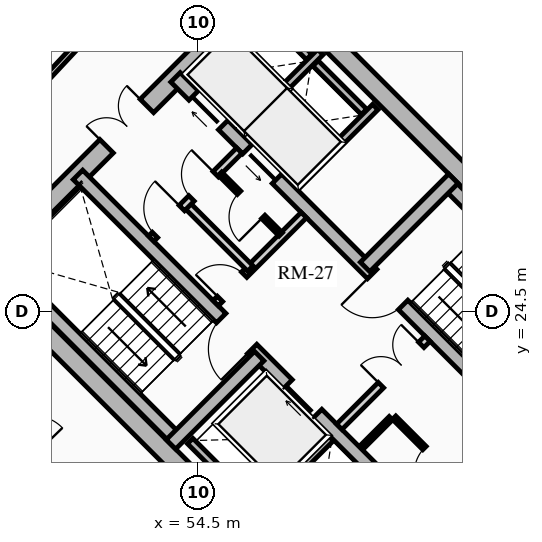
"""IFC4 building model, lengths in metres.
Left out: names, types, materials, properties, quantities, classifications, styles, units other than length and angle.
Written with IfcOpenShell. Run it as: python <this file> out.ifc"""

import sys

from ifc_helpers import new_model, si_unit, direction, frame, frame_2d, origin, place, context, subcontext, project, spatial, rectangle, extrude, source, transform, mapped, element, fill, save


model = new_model("IFC4")
c1 = context("Model", 3, precision=1e-05, world=origin(), true_north=direction((0.0, 1.0)))
c2 = subcontext(c1, "Body", "Model", "MODEL_VIEW")
j1 = project(units=[si_unit("LENGTHUNIT", "METRE"), si_unit("PLANEANGLEUNIT", "RADIAN")], contexts=[c1])
p1 = place(None, origin())
s1 = spatial("IfcSite", under=j1, at=p1, CompositionType="ELEMENT")
p2 = place(p1, origin())
s2 = spatial("IfcBuilding", under=s1, at=p2, CompositionType="ELEMENT")
p3 = place(p2, frame((0.0, 0.0, 30.73)))
s3 = spatial("IfcBuildingStorey", under=s2, at=p3, CompositionType="ELEMENT", Elevation=30.73)
for number, where, z_axis, x_axis in (
    (1, (58.773, 15.661, 0.0), (0.0, 0.0, 1.0), (-0.707, 0.707, 0.0)),
    (2, (66.339, 23.227, 0.0), (0.0, 0.0, 1.0), (-0.707, 0.707, 0.0)),
):
    element("IfcWall", number, at=place(p3, frame(where, z_axis=z_axis, x_axis=x_axis)), inside=s3, PredefinedType="SHEAR", context=c2, shape_type="SweptSolid", body=[
        extrude(rectangle(XDim=14.3, YDim=0.5, at=frame_2d((7.15, 0.0))), origin(), (0.0, 0.0, 1.0), 2.91),
    ])
p4 = place(p3, frame((58.596, 15.838, 0.0), z_axis=(0.0, 0.0, 1.0), x_axis=(0.707106781187, 0.707106781187, 0.0)))
e3 = element("IfcWall", 3, at=p4, inside=s3, PredefinedType="SHEAR", context=c2, shape_type="SweptSolid", body=[
    extrude(rectangle(XDim=10.7, YDim=0.5, at=frame_2d((5.35, 0.0))), origin(), (0.0, 0.0, 1.0), 2.91),
])
m1 = source(origin(), c2, "Body", "SweptSolid", [
    extrude(rectangle(XDim=1.5, YDim=2.02, at=frame_2d((0.75, 1.01))), frame((0.0, 0.26, 0.0), z_axis=(0.0, -1.0, 0.0), x_axis=(1.0, 0.0, 0.0)), (0.0, 0.0, 1.0), 0.52),
])
p5 = place(p4, frame((5.45, 0.0, 0.0)))
e4 = element("IfcOpeningElement", 4, at=p5, cuts=e3, PredefinedType="OPENING", context=c2, shape_type="MappedRepresentation", body=[
    mapped(m1, transform((0.0, 0.0, 0.0), x_axis=(1.0, 0.0, 0.0), y_axis=(0.0, 1.0, 0.0), z_axis=(0.0, 0.0, 1.0), scale=1.0)),
])
p6 = place(p3, frame((48.838, 25.596, 0.0), z_axis=(0.0, 0.0, 1.0), x_axis=(0.707106781187, 0.707106781187, 0.0)))
e5 = element("IfcWall", 5, at=p6, inside=s3, PredefinedType="SHEAR", context=c2, shape_type="SweptSolid", body=[
    extrude(rectangle(XDim=10.7, YDim=0.5, at=frame_2d((5.35, 0.0))), origin(), (0.0, 0.0, 1.0), 2.91),
])
p7 = place(p6, frame((4.6, 0.0, 0.0)))
e6 = element("IfcOpeningElement", 6, at=p7, cuts=e5, PredefinedType="OPENING", context=c2, shape_type="MappedRepresentation", body=[
    mapped(m1, transform((0.0, 0.0, 0.0), x_axis=(1.0, 0.0, 0.0), y_axis=(0.0, 1.0, 0.0), z_axis=(0.0, 0.0, 1.0), scale=1.0)),
])
p8 = place(p3, frame((61.096, 18.338, 0.0), z_axis=(0.0, 0.0, 1.0), x_axis=(-0.707106781187, 0.707106781187, 0.0)))
e7 = element("IfcWall", 7, at=p8, inside=s3, PredefinedType="SHEAR", context=c2, shape_type="SweptSolid", body=[
    extrude(rectangle(XDim=13.8, YDim=0.35, at=frame_2d((6.9, 0.0))), origin(), (0.0, 0.0, 1.0), 2.91),
])
m2 = source(origin(), c2, "Body", "SweptSolid", [
    extrude(rectangle(XDim=1.1, YDim=2.015, at=frame_2d((0.55, 1.007))), frame((0.0, 0.185, 0.0), z_axis=(0.0, -1.0, 0.0), x_axis=(1.0, 0.0, 0.0)), (0.0, 0.0, 1.0), 0.37),
])
p9 = place(p8, frame((4.9, 0.0, 0.0)))
e8 = element("IfcOpeningElement", 8, at=p9, cuts=e7, PredefinedType="OPENING", context=c2, shape_type="MappedRepresentation", body=[
    mapped(m2, transform((0.0, 0.0, 0.0), x_axis=(1.0, 0.0, 0.0), y_axis=(0.0, 1.0, 0.0), z_axis=(0.0, 0.0, 1.0), scale=1.0)),
])
m3 = source(origin(), c2, "Body", "SweptSolid", [
    extrude(rectangle(XDim=1.15, YDim=2.02, at=frame_2d((0.575, 1.01))), frame((0.0, 0.185, 0.0), z_axis=(0.0, -1.0, 0.0), x_axis=(1.0, 0.0, 0.0)), (0.0, 0.0, 1.0), 0.37),
])
p10 = place(p8, frame((7.32, 0.0, 0.0)))
e9 = element("IfcOpeningElement", 9, at=p10, cuts=e7, PredefinedType="OPENING", context=c2, shape_type="MappedRepresentation", body=[
    mapped(m3, transform((0.0, 0.0, 0.0), x_axis=(1.0, 0.0, 0.0), y_axis=(0.0, 1.0, 0.0), z_axis=(0.0, 0.0, 1.0), scale=1.0)),
])
p11 = place(p3, frame((63.662, 20.904, 0.0), z_axis=(0.0, 0.0, 1.0), x_axis=(-0.707106781187, 0.707106781187, 0.0)))
e10 = element("IfcWall", 10, at=p11, inside=s3, PredefinedType="SHEAR", context=c2, shape_type="SweptSolid", body=[
    extrude(rectangle(XDim=13.8, YDim=0.35, at=frame_2d((6.9, 0.0))), origin(), (0.0, 0.0, 1.0), 2.91),
])
p12 = place(p11, frame((10.025, 0.0, 0.0)))
e11 = element("IfcOpeningElement", 11, at=p12, cuts=e10, PredefinedType="OPENING", context=c2, shape_type="MappedRepresentation", body=[
    mapped(m2, transform((0.0, 0.0, 0.0), x_axis=(1.0, 0.0, 0.0), y_axis=(0.0, 1.0, 0.0), z_axis=(0.0, 0.0, 1.0), scale=1.0)),
])
p13 = place(p11, frame((12.025, 0.0, 0.0)))
e12 = element("IfcOpeningElement", 12, at=p13, cuts=e10, PredefinedType="OPENING", context=c2, shape_type="MappedRepresentation", body=[
    mapped(m2, transform((0.0, 0.0, 0.0), x_axis=(1.0, 0.0, 0.0), y_axis=(0.0, 1.0, 0.0), z_axis=(0.0, 0.0, 1.0), scale=1.0)),
])
p14 = place(p11, frame((5.33, 0.0, 0.0)))
e13 = element("IfcOpeningElement", 13, at=p14, cuts=e10, PredefinedType="OPENING", context=c2, shape_type="MappedRepresentation", body=[
    mapped(m3, transform((0.0, 0.0, 0.0), x_axis=(1.0, 0.0, 0.0), y_axis=(0.0, 1.0, 0.0), z_axis=(0.0, 0.0, 1.0), scale=1.0)),
])
p15 = place(p3, frame((53.922, 21.141, 0.0), z_axis=(0.0, 0.0, 1.0), x_axis=(-0.707106781187, 0.707106781187, 0.0)))
e14 = element("IfcWall", 14, at=p15, inside=s3, PredefinedType="SHEAR", context=c2, shape_type="SweptSolid", body=[
    extrude(rectangle(XDim=6.745, YDim=0.35, at=frame_2d((3.373, 0.0))), origin(), (0.0, 0.0, 1.0), 2.91),
])
p16 = place(p3, frame((53.784, 21.003, 0.0), z_axis=(0.0, 0.0, 1.0), x_axis=(0.707106781187, 0.707106781187, 0.0)))
e15 = element("IfcWall", 15, at=p16, inside=s3, PredefinedType="SHEAR", context=c2, shape_type="SweptSolid", body=[
    extrude(rectangle(XDim=3.285, YDim=0.35, at=frame_2d((1.643, 0.0))), origin(), (0.0, 0.0, 1.0), 2.91),
])
p17 = place(p3, frame((65.847, 23.089, 0.0), z_axis=(0.0, 0.0, 1.0), x_axis=(-0.707106781187, 0.707106781187, 0.0)))
e16 = element("IfcWall", 16, at=p17, inside=s3, PredefinedType="SHEAR", context=c2, shape_type="SweptSolid", body=[
    extrude(rectangle(XDim=6.745, YDim=0.35, at=frame_2d((3.373, 0.0))), origin(), (0.0, 0.0, 1.0), 2.91),
])
p18 = place(p3, frame((58.893, 25.674, 0.0), z_axis=(0.0, 0.0, 1.0), x_axis=(0.707106781187, 0.707106781187, 0.0)))
e17 = element("IfcWall", 17, at=p18, inside=s3, PredefinedType="SHEAR", context=c2, shape_type="SweptSolid", body=[
    extrude(rectangle(XDim=3.285, YDim=0.35, at=frame_2d((1.643, 0.0))), origin(), (0.0, 0.0, 1.0), 2.91),
])
p19 = place(p3, frame((55.888, 19.069, 0.0), z_axis=(0.0, 0.0, 1.0), x_axis=(0.707106781187, 0.707106781187, 0.0)))
e18 = element("IfcWall", 18, at=p19, inside=s3, PredefinedType="SHEAR", context=c2, shape_type="SweptSolid", body=[
    extrude(rectangle(XDim=2.97, YDim=0.2, at=frame_2d((1.485, 0.0))), origin(), (0.0, 0.0, 1.0), 2.91),
])
p20 = place(p3, frame((56.015, 19.366, 0.0), z_axis=(0.0, 0.0, 1.0), x_axis=(-0.707106781187, 0.707106781187, 0.0)))
e19 = element("IfcWall", 19, at=p20, inside=s3, PredefinedType="SHEAR", context=c2, shape_type="SweptSolid", body=[
    extrude(rectangle(XDim=2.44, YDim=0.2, at=frame_2d((1.22, 0.0))), origin(), (0.0, 0.0, 1.0), 2.91),
])
p21 = place(p3, frame((57.062, 27.781, 0.0), z_axis=(0.0, 0.0, 1.0), x_axis=(0.707106781187, 0.707106781187, 0.0)))
e20 = element("IfcWall", 20, at=p21, inside=s3, PredefinedType="SHEAR", context=c2, shape_type="SweptSolid", body=[
    extrude(rectangle(XDim=2.97, YDim=0.2, at=frame_2d((1.485, 0.0))), origin(), (0.0, 0.0, 1.0), 2.91),
])
p22 = place(p3, frame((55.615, 29.227, 0.0), z_axis=(0.0, 0.0, 1.0), x_axis=(0.707147878904, 0.70706568108, 0.0)))
e21 = element("IfcWall", 21, at=p22, inside=s3, PredefinedType="SHEAR", context=c2, shape_type="SweptSolid", body=[
    extrude(rectangle(XDim=2.97, YDim=0.2, at=frame_2d((1.485, 0.0))), origin(), (0.0, 0.0, 1.0), 2.91),
])
p23 = place(p3, frame((58.865, 29.754, 0.0), z_axis=(0.0, 0.0, 1.0), x_axis=(-0.707174411312, 0.707039144592, 0.0)))
e22 = element("IfcWall", 22, at=p23, inside=s3, PredefinedType="SHEAR", context=c2, shape_type="SweptSolid", body=[
    extrude(rectangle(XDim=1.805, YDim=0.2, at=frame_2d((0.902, 0.0))), origin(), (0.0, 0.0, 1.0), 2.91),
])
p24 = place(p3, frame((57.419, 31.2, 0.0), z_axis=(0.0, 0.0, 1.0), x_axis=(-0.707032117043, 0.707181437447, 0.0)))
e23 = element("IfcWall", 23, at=p24, inside=s3, PredefinedType="SHEAR", context=c2, shape_type="SweptSolid", body=[
    extrude(rectangle(XDim=1.635, YDim=0.2, at=frame_2d((0.817, 0.0))), origin(), (0.0, 0.0, 1.0), 2.91),
])
p25 = place(p3, frame((58.214, 21.467, 0.0), z_axis=(0.0, 0.0, 1.0), x_axis=(0.707106781187, 0.707106781187, 0.0)))
e24 = element("IfcWall", 24, at=p25, inside=s3, PredefinedType="PARTITIONING", context=c2, shape_type="SweptSolid", body=[
    extrude(rectangle(XDim=3.28, YDim=0.2, at=frame_2d((1.64, 0.0))), origin(), (0.0, 0.0, 1.0), 2.635),
])
m4 = source(origin(), c2, "Body", "SweptSolid", [
    extrude(rectangle(XDim=1.5, YDim=2.02, at=frame_2d((0.75, 1.01))), frame((0.0, 0.11, 0.0), z_axis=(0.0, -1.0, 0.0), x_axis=(1.0, 0.0, 0.0)), (0.0, 0.0, 1.0), 0.22),
])
p26 = place(p25, frame((1.55, 0.0, 0.0)))
e25 = element("IfcOpeningElement", 25, at=p26, cuts=e24, PredefinedType="OPENING", context=c2, shape_type="MappedRepresentation", body=[
    mapped(m4, transform((0.0, 0.0, 0.0), x_axis=(1.0, 0.0, 0.0), y_axis=(0.0, 1.0, 0.0), z_axis=(0.0, 0.0, 1.0), scale=1.0)),
])
p27 = place(p3, frame((54.961, 24.719, 0.0), z_axis=(0.0, 0.0, 1.0), x_axis=(0.707106781187, 0.707106781187, 0.0)))
e26 = element("IfcWall", 26, at=p27, inside=s3, PredefinedType="PARTITIONING", context=c2, shape_type="SweptSolid", body=[
    extrude(rectangle(XDim=3.28, YDim=0.2, at=frame_2d((1.64, 0.0))), origin(), (0.0, 0.0, 1.0), 2.635),
])
m5 = source(origin(), c2, "Body", "SweptSolid", [
    extrude(rectangle(XDim=0.9, YDim=2.005, at=frame_2d((0.45, 1.002))), frame((0.0, 0.11, 0.0), z_axis=(0.0, -1.0, 0.0), x_axis=(1.0, 0.0, 0.0)), (0.0, 0.0, 1.0), 0.22),
])
p28 = place(p27, frame((0.16, 0.0, 0.0)))
e27 = element("IfcOpeningElement", 27, at=p28, cuts=e26, PredefinedType="OPENING", context=c2, shape_type="MappedRepresentation", body=[
    mapped(m5, transform((0.0, 0.0, 0.0), x_axis=(1.0, 0.0, 0.0), y_axis=(0.0, 1.0, 0.0), z_axis=(0.0, 0.0, 1.0), scale=1.0)),
])
p29 = place(p3, frame((55.874, 25.631, 0.0), z_axis=(0.0, 0.0, 1.0), x_axis=(-0.707157639372, 0.707055919343, 0.0)))
e28 = element("IfcWall", 28, at=p29, inside=s3, PredefinedType="PARTITIONING", context=c2, shape_type="SweptSolid", body=[
    extrude(rectangle(XDim=2.4, YDim=0.2, at=frame_2d((1.2, 0.0))), origin(), (0.0, 0.0, 1.0), 2.635),
])
p30 = place(p3, frame((53.264, 26.416, 0.0), z_axis=(0.0, 0.0, 1.0), x_axis=(0.707106781187, 0.707106781187, 0.0)))
e29 = element("IfcWall", 29, at=p30, inside=s3, PredefinedType="PARTITIONING", context=c2, shape_type="SweptSolid", body=[
    extrude(rectangle(XDim=3.28, YDim=0.2, at=frame_2d((1.64, 0.0))), origin(), (0.0, 0.0, 1.0), 2.635),
])
m6 = source(origin(), c2, "Body", "SweptSolid", [
    extrude(rectangle(XDim=1.0, YDim=2.015, at=frame_2d((0.5, 1.007))), frame((0.0, 0.11, 0.0), z_axis=(0.0, -1.0, 0.0), x_axis=(1.0, 0.0, 0.0)), (0.0, 0.0, 1.0), 0.22),
])
p31 = place(p30, frame((0.14, 0.0, 0.0)))
e30 = element("IfcOpeningElement", 30, at=p31, cuts=e29, PredefinedType="OPENING", context=c2, shape_type="MappedRepresentation", body=[
    mapped(m6, transform((0.0, 0.0, 0.0), x_axis=(1.0, 0.0, 0.0), y_axis=(0.0, 1.0, 0.0), z_axis=(0.0, 0.0, 1.0), scale=1.0)),
])
p32 = place(p30, frame((1.5, 0.0, 0.0)))
e31 = element("IfcOpeningElement", 31, at=p32, cuts=e29, PredefinedType="OPENING", context=c2, shape_type="MappedRepresentation", body=[
    mapped(m5, transform((0.0, 0.0, 0.0), x_axis=(1.0, 0.0, 0.0), y_axis=(0.0, 1.0, 0.0), z_axis=(0.0, 0.0, 1.0), scale=1.0)),
])
p33 = place(p3, frame((61.835, 19.529, 0.0), z_axis=(0.0, 0.0, 1.0), x_axis=(-0.707146413884, 0.707067146267, 0.0)))
e32 = element("IfcWall", 32, at=p33, inside=s3, PredefinedType="PARTITIONING", context=c2, shape_type="SweptSolid", body=[
    extrude(rectangle(XDim=3.08, YDim=0.125, at=frame_2d((1.54, 0.0))), origin(), (0.0, 0.0, 1.0), 2.635),
])
m7 = source(origin(), c2, "Body", "SweptSolid", [
    extrude(rectangle(XDim=0.9, YDim=2.005, at=frame_2d((0.45, 1.002))), frame((0.0, 0.073, 0.0), z_axis=(0.0, -1.0, 0.0), x_axis=(1.0, 0.0, 0.0)), (0.0, 0.0, 1.0), 0.145),
])
p34 = place(p33, frame((1.05, 0.0, 0.0)))
e33 = element("IfcOpeningElement", 33, at=p34, cuts=e32, PredefinedType="OPENING", context=c2, shape_type="MappedRepresentation", body=[
    mapped(m7, transform((0.0, 0.0, 0.0), x_axis=(1.0, 0.0, 0.0), y_axis=(0.0, 1.0, 0.0), z_axis=(0.0, 0.0, 1.0), scale=1.0)),
])
p35 = place(p3, frame((58.794, 20.915, 0.0), z_axis=(0.0, 0.0, 1.0), x_axis=(0.707106781187, 0.707106781187, 0.0)))
e34 = element("IfcWall", 34, at=p35, inside=s3, PredefinedType="PARTITIONING", context=c2, shape_type="SweptSolid", body=[
    extrude(rectangle(XDim=1.1, YDim=0.125, at=frame_2d((0.55, 0.0))), origin(), (0.0, 0.0, 1.0), 2.635),
])
p36 = place(p3, frame((56.673, 26.529, 0.0), z_axis=(0.0, 0.0, 1.0), x_axis=(-0.707052764397, 0.70716079385, 0.0)))
e35 = element("IfcWall", 35, at=p36, inside=s3, PredefinedType="PARTITIONING", context=c2, shape_type="SweptSolid", body=[
    extrude(rectangle(XDim=2.26, YDim=0.125, at=frame_2d((1.13, 0.0))), origin(), (0.0, 0.0, 1.0), 2.635),
])
p37 = place(p36, frame((0.65, 0.0, 0.0)))
e36 = element("IfcOpeningElement", 36, at=p37, cuts=e35, PredefinedType="OPENING", context=c2, shape_type="MappedRepresentation", body=[
    mapped(m7, transform((0.0, 0.0, 0.0), x_axis=(1.0, 0.0, 0.0), y_axis=(0.0, 1.0, 0.0), z_axis=(0.0, 0.0, 1.0), scale=1.0)),
])
p38 = place(p3, frame((63.086, 30.086, 0.0), z_axis=(0.0, 0.0, 1.0), x_axis=(-0.699075897379, 0.715047473741, 0.0)))
e37 = element("IfcWall", 37, at=p38, inside=s3, PredefinedType="PARTITIONING", context=c2, shape_type="SweptSolid", body=[
    extrude(rectangle(XDim=6.114, YDim=0.15, at=frame_2d((3.057, 0.0))), origin(), (0.0, 0.0, 1.0), 2.159),
])
m8 = source(origin(), c2, "Body", "SweptSolid", [
    extrude(rectangle(XDim=1.05, YDim=2.015, at=frame_2d((0.525, 1.007))), frame((0.0, 0.085, 0.0), z_axis=(0.0, -1.0, 0.0), x_axis=(1.0, 0.0, 0.0)), (0.0, 0.0, 1.0), 0.17),
])
p39 = place(p38, frame((2.532, 0.0, 0.0)))
e38 = element("IfcOpeningElement", 38, at=p39, cuts=e37, PredefinedType="OPENING", context=c2, shape_type="MappedRepresentation", body=[
    mapped(m8, transform((0.0, 0.0, 0.0), x_axis=(1.0, 0.0, 0.0), y_axis=(0.0, 1.0, 0.0), z_axis=(0.0, 0.0, 1.0), scale=1.0)),
])
p40 = place(p3, frame((52.043, 32.28, 0.0), z_axis=(0.0, 0.0, 1.0), x_axis=(-0.682606081633, -0.730786519661, 0.0)))
e39 = element("IfcWall", 39, at=p40, inside=s3, PredefinedType="PARTITIONING", context=c2, shape_type="SweptSolid", body=[
    extrude(rectangle(XDim=6.527, YDim=0.15, at=frame_2d((3.263, 0.0))), origin(), (0.0, 0.0, 1.0), 2.159),
])
p41 = place(p3, frame((47.706, 23.253, 0.0), z_axis=(0.0, 0.0, 1.0), x_axis=(0.696179266346, -0.717867974707, 0.0)))
e40 = element("IfcWall", 40, at=p41, inside=s3, PredefinedType="PARTITIONING", context=c2, shape_type="SweptSolid", body=[
    extrude(rectangle(XDim=6.045, YDim=0.15, at=frame_2d((3.022, 0.0))), origin(), (0.0, 0.0, 1.0), 2.635),
])
p42 = place(p41, frame((2.497, 0.0, 0.0)))
e41 = element("IfcOpeningElement", 41, at=p42, cuts=e40, PredefinedType="OPENING", context=c2, shape_type="MappedRepresentation", body=[
    mapped(m8, transform((0.0, 0.0, 0.0), x_axis=(1.0, 0.0, 0.0), y_axis=(0.0, 1.0, 0.0), z_axis=(0.0, 0.0, 1.0), scale=1.0)),
])
m9 = source(origin(), c2, "Body", "SweptSolid", [
    extrude(rectangle(XDim=1.1, YDim=2.015, at=frame_2d((0.55, 1.007))), frame((0.0, 0.025, 0.0), z_axis=(0.0, -1.0, 0.0), x_axis=(1.0, 0.0, 0.0)), (0.0, 0.0, 1.0), 0.05),
])
p43 = place(p9, origin())
e42 = element("IfcDoor", 42, at=p43, inside=s3, OperationType="SLIDING_TO_RIGHT", PredefinedType="DOOR", context=c2, shape_type="MappedRepresentation", body=[
    mapped(m9, transform((0.0, 0.0, 0.0), x_axis=(1.0, 0.0, 0.0), y_axis=(0.0, 1.0, 0.0), z_axis=(0.0, 0.0, 1.0), scale=1.0)),
])
fill(e8, e42)
p44 = place(p12, origin())
e43 = element("IfcDoor", 43, at=p44, inside=s3, OperationType="SLIDING_TO_LEFT", PredefinedType="DOOR", context=c2, shape_type="MappedRepresentation", body=[
    mapped(m9, transform((0.0, 0.0, 0.0), x_axis=(1.0, 0.0, 0.0), y_axis=(0.0, 1.0, 0.0), z_axis=(0.0, 0.0, 1.0), scale=1.0)),
])
fill(e11, e43)
p45 = place(p13, origin())
e44 = element("IfcDoor", 44, at=p45, inside=s3, OperationType="SLIDING_TO_RIGHT", PredefinedType="DOOR", context=c2, shape_type="MappedRepresentation", body=[
    mapped(m9, transform((0.0, 0.0, 0.0), x_axis=(1.0, 0.0, 0.0), y_axis=(0.0, 1.0, 0.0), z_axis=(0.0, 0.0, 1.0), scale=1.0)),
])
fill(e12, e44)
m10 = source(origin(), c2, "Body", "SweptSolid", [
    extrude(rectangle(XDim=1.15, YDim=2.02, at=frame_2d((0.575, 1.01))), frame((0.0, 0.025, 0.0), z_axis=(0.0, -1.0, 0.0), x_axis=(1.0, 0.0, 0.0)), (0.0, 0.0, 1.0), 0.05),
])
p46 = place(p10, origin())
e45 = element("IfcDoor", 45, at=p46, inside=s3, OperationType="SINGLE_SWING_LEFT", PredefinedType="DOOR", context=c2, shape_type="MappedRepresentation", body=[
    mapped(m10, transform((0.0, 0.0, 0.0), x_axis=(1.0, 0.0, 0.0), y_axis=(0.0, 1.0, 0.0), z_axis=(0.0, 0.0, 1.0), scale=1.0)),
])
fill(e9, e45)
p47 = place(p14, origin())
e46 = element("IfcDoor", 46, at=p47, inside=s3, OperationType="SINGLE_SWING_RIGHT", PredefinedType="DOOR", context=c2, shape_type="MappedRepresentation", body=[
    mapped(m10, transform((0.0, 0.0, 0.0), x_axis=(1.0, 0.0, 0.0), y_axis=(0.0, 1.0, 0.0), z_axis=(0.0, 0.0, 1.0), scale=1.0)),
])
fill(e13, e46)
m11 = source(origin(), c2, "Body", "SweptSolid", [
    extrude(rectangle(XDim=1.5, YDim=2.02, at=frame_2d((0.75, 1.01))), frame((0.0, 0.025, 0.0), z_axis=(0.0, -1.0, 0.0), x_axis=(1.0, 0.0, 0.0)), (0.0, 0.0, 1.0), 0.05),
])
p48 = place(p7, origin())
e47 = element("IfcDoor", 47, at=p48, inside=s3, OperationType="DOUBLE_DOOR_SINGLE_SWING", PredefinedType="DOOR", context=c2, shape_type="MappedRepresentation", body=[
    mapped(m11, transform((0.0, 0.0, 0.0), x_axis=(1.0, 0.0, 0.0), y_axis=(0.0, 1.0, 0.0), z_axis=(0.0, 0.0, 1.0), scale=1.0)),
])
fill(e6, e47)
p49 = place(p26, origin())
e48 = element("IfcDoor", 48, at=p49, inside=s3, OperationType="DOUBLE_DOOR_SINGLE_SWING", PredefinedType="DOOR", context=c2, shape_type="MappedRepresentation", body=[
    mapped(m11, transform((0.0, 0.0, 0.0), x_axis=(1.0, 0.0, 0.0), y_axis=(0.0, 1.0, 0.0), z_axis=(0.0, 0.0, 1.0), scale=1.0)),
])
fill(e25, e48)
m12 = source(origin(), c2, "Body", "SweptSolid", [
    extrude(rectangle(XDim=0.9, YDim=2.005, at=frame_2d((0.45, 1.002))), frame((0.0, 0.025, 0.0), z_axis=(0.0, -1.0, 0.0), x_axis=(1.0, 0.0, 0.0)), (0.0, 0.0, 1.0), 0.05),
])
p50 = place(p28, origin())
e49 = element("IfcDoor", 49, at=p50, inside=s3, OperationType="SINGLE_SWING_LEFT", PredefinedType="DOOR", context=c2, shape_type="MappedRepresentation", body=[
    mapped(m12, transform((0.0, 0.0, 0.0), x_axis=(1.0, 0.0, 0.0), y_axis=(0.0, 1.0, 0.0), z_axis=(0.0, 0.0, 1.0), scale=1.0)),
])
fill(e27, e49)
m13 = source(origin(), c2, "Body", "SweptSolid", [
    extrude(rectangle(XDim=1.0, YDim=2.015, at=frame_2d((0.5, 1.007))), frame((0.0, 0.025, 0.0), z_axis=(0.0, -1.0, 0.0), x_axis=(1.0, 0.0, 0.0)), (0.0, 0.0, 1.0), 0.05),
])
p51 = place(p31, origin())
e50 = element("IfcDoor", 50, at=p51, inside=s3, OperationType="SINGLE_SWING_RIGHT", PredefinedType="DOOR", context=c2, shape_type="MappedRepresentation", body=[
    mapped(m13, transform((0.0, 0.0, 0.0), x_axis=(1.0, 0.0, 0.0), y_axis=(0.0, 1.0, 0.0), z_axis=(0.0, 0.0, 1.0), scale=1.0)),
])
fill(e30, e50)
p52 = place(p34, origin())
e51 = element("IfcDoor", 51, at=p52, inside=s3, OperationType="SINGLE_SWING_LEFT", PredefinedType="DOOR", context=c2, shape_type="MappedRepresentation", body=[
    mapped(m12, transform((0.0, 0.0, 0.0), x_axis=(1.0, 0.0, 0.0), y_axis=(0.0, 1.0, 0.0), z_axis=(0.0, 0.0, 1.0), scale=1.0)),
])
fill(e33, e51)
p53 = place(p32, origin())
e52 = element("IfcDoor", 52, at=p53, inside=s3, OperationType="SINGLE_SWING_RIGHT", PredefinedType="DOOR", context=c2, shape_type="MappedRepresentation", body=[
    mapped(m12, transform((0.0, 0.0, 0.0), x_axis=(1.0, 0.0, 0.0), y_axis=(0.0, 1.0, 0.0), z_axis=(0.0, 0.0, 1.0), scale=1.0)),
])
fill(e31, e52)
p54 = place(p37, origin())
e53 = element("IfcDoor", 53, at=p54, inside=s3, OperationType="SINGLE_SWING_LEFT", PredefinedType="DOOR", context=c2, shape_type="MappedRepresentation", body=[
    mapped(m12, transform((0.0, 0.0, 0.0), x_axis=(1.0, 0.0, 0.0), y_axis=(0.0, 1.0, 0.0), z_axis=(0.0, 0.0, 1.0), scale=1.0)),
])
fill(e36, e53)
save(model, sys.argv[1])
